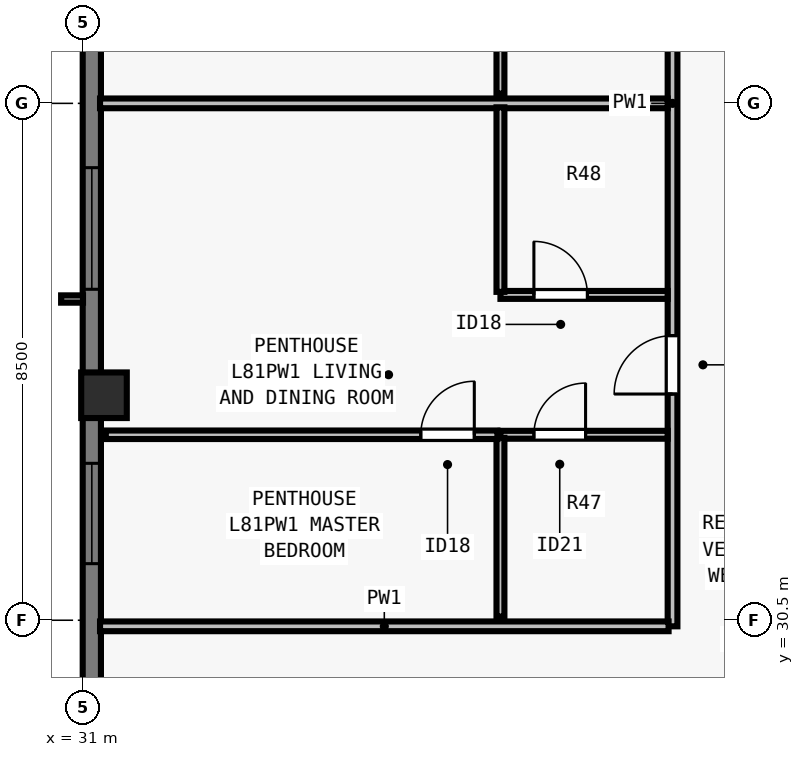
"""IFC4 building model, lengths in metres.
Left out: names, types, materials, properties, quantities, classifications, styles, units other than length and angle.
Written with IfcOpenShell. Run it as: python <this file> out.ifc"""

import sys

from ifc_helpers import new_model, si_unit, direction, frame, frame_2d, origin, origin_2d, place, context, subcontext, project, spatial, rectangle, extrude, element, fill, save


model = new_model("IFC4")
c1 = context("Model", 3, precision=1e-05, world=origin(), true_north=direction((0.0, 1.0)))
c2 = subcontext(c1, "Body", "Model", "MODEL_VIEW")
j1 = project(units=[si_unit("LENGTHUNIT", "METRE"), si_unit("PLANEANGLEUNIT", "RADIAN")], contexts=[c1])
p1 = place(None, origin())
s1 = spatial("IfcSite", under=j1, at=p1, CompositionType="ELEMENT")
p2 = place(p1, origin())
s2 = spatial("IfcBuilding", under=s1, at=p2, CompositionType="ELEMENT")
p3 = place(p2, frame((0.0, 0.0, 294.5)))
s3 = spatial("IfcBuildingStorey", under=s2, at=p3, CompositionType="ELEMENT", Elevation=294.5)
p4 = place(p3, frame((31.35, 34.2, 0.0), z_axis=(0.0, 0.0, 1.0), x_axis=(0.0, 1.0, 0.0)))
e1 = element("IfcColumn", 1, at=p4, inside=s3, PredefinedType="COLUMN", context=c2, shape_type="SweptSolid", body=[
    extrude(rectangle(XDim=0.75, YDim=0.75, at=origin_2d()), origin(), (0.0, 0.0, 1.0), 3.5),
])
p5 = place(p3, frame((31.15, 23.5, 0.0), z_axis=(0.0, 0.0, 1.0), x_axis=(0.0, 1.0, 0.0)))
e2 = element("IfcWall", 2, at=p5, inside=s3, PredefinedType="SOLIDWALL", context=c2, shape_type="SweptSolid", body=[
    extrude(rectangle(XDim=30.722, YDim=0.3, at=frame_2d((15.361, 0.0))), origin(), (0.0, 0.0, 1.0), 3.29),
])
p6 = place(p5, frame((7.93, 0.0, 0.8)))
e3 = element("IfcOpeningElement", 3, at=p6, cuts=e2, PredefinedType="OPENING", context=c2, shape_type="SweptSolid", body=[
    extrude(rectangle(XDim=1.65, YDim=1.758, at=frame_2d((0.825, 0.879))), frame((0.0, 0.16, 0.0), z_axis=(0.0, -1.0, 0.0), x_axis=(1.0, 0.0, 0.0)), (0.0, 0.0, 1.0), 0.32),
])
p7 = place(p5, frame((12.442, 0.0, 0.8)))
e4 = element("IfcOpeningElement", 4, at=p7, cuts=e2, PredefinedType="OPENING", context=c2, shape_type="SweptSolid", body=[
    extrude(rectangle(XDim=2.0, YDim=1.758, at=frame_2d((1.0, 0.879))), frame((0.0, 0.16, 0.0), z_axis=(0.0, -1.0, 0.0), x_axis=(1.0, 0.0, 0.0)), (0.0, 0.0, 1.0), 0.32),
])
p8 = place(p5, frame((16.455, 0.0, 0.8)))
e5 = element("IfcOpeningElement", 5, at=p8, cuts=e2, PredefinedType="OPENING", context=c2, shape_type="SweptSolid", body=[
    extrude(rectangle(XDim=1.65, YDim=1.758, at=frame_2d((0.825, 0.879))), frame((0.0, 0.16, 0.0), z_axis=(0.0, -1.0, 0.0), x_axis=(1.0, 0.0, 0.0)), (0.0, 0.0, 1.0), 0.32),
])
p9 = place(p5, frame((20.967, 0.0, 0.8)))
e6 = element("IfcOpeningElement", 6, at=p9, cuts=e2, PredefinedType="OPENING", context=c2, shape_type="SweptSolid", body=[
    extrude(rectangle(XDim=2.0, YDim=1.758, at=frame_2d((1.0, 0.879))), frame((0.0, 0.16, 0.0), z_axis=(0.0, -1.0, 0.0), x_axis=(1.0, 0.0, 0.0)), (0.0, 0.0, 1.0), 0.32),
])
p10 = place(p5, frame((24.579, 0.0, 0.8)))
e7 = element("IfcOpeningElement", 7, at=p10, cuts=e2, PredefinedType="OPENING", context=c2, shape_type="SweptSolid", body=[
    extrude(rectangle(XDim=1.65, YDim=1.758, at=frame_2d((0.825, 0.879))), frame((0.0, 0.16, 0.0), z_axis=(0.0, -1.0, 0.0), x_axis=(1.0, 0.0, 0.0)), (0.0, 0.0, 1.0), 0.32),
])
p11 = place(p5, frame((27.11, 0.0, 0.8)))
e8 = element("IfcOpeningElement", 8, at=p11, cuts=e2, PredefinedType="OPENING", context=c2, shape_type="SweptSolid", body=[
    extrude(rectangle(XDim=0.9, YDim=1.75, at=frame_2d((0.45, 0.875))), frame((0.0, 0.16, 0.0), z_axis=(0.0, -1.0, 0.0), x_axis=(1.0, 0.0, 0.0)), (0.0, 0.0, 1.0), 0.32),
])
p12 = place(p3, frame((40.7, 30.4, 0.0), z_axis=(0.0, 0.0, 1.0), x_axis=(0.0, 1.0, 0.0)))
e9 = element("IfcWall", 9, at=p12, inside=s3, PredefinedType="PARTITIONING", context=c2, shape_type="SweptSolid", body=[
    extrude(rectangle(XDim=17.2, YDim=0.16, at=frame_2d((8.6, 0.0))), origin(), (0.0, 0.0, 1.0), 3.009),
])
p13 = place(p12, frame((3.82, 0.0, 0.0)))
e10 = element("IfcOpeningElement", 10, at=p13, cuts=e9, PredefinedType="OPENING", context=c2, shape_type="SweptSolid", body=[
    extrude(rectangle(XDim=0.96, YDim=2.18, at=frame_2d((0.48, 1.09))), frame((0.0, 0.09, 0.0), z_axis=(0.0, -1.0, 0.0), x_axis=(1.0, 0.0, 0.0)), (0.0, 0.0, 1.0), 0.18),
])
p14 = place(p12, frame((12.42, 0.0, 0.0)))
e11 = element("IfcOpeningElement", 11, at=p14, cuts=e9, PredefinedType="OPENING", context=c2, shape_type="SweptSolid", body=[
    extrude(rectangle(XDim=0.96, YDim=2.18, at=frame_2d((0.48, 1.09))), frame((0.0, 0.09, 0.0), z_axis=(0.0, -1.0, 0.0), x_axis=(1.0, 0.0, 0.0)), (0.0, 0.0, 1.0), 0.18),
])
p15 = place(p3, frame((31.285, 30.4, 0.0), z_axis=(0.0, 0.0, 1.0), x_axis=(1.0, 0.0, 0.0)))
e12 = element("IfcWall", 12, at=p15, inside=s3, PredefinedType="PARTITIONING", context=c2, shape_type="SweptSolid", body=[
    extrude(rectangle(XDim=9.35, YDim=0.16, at=frame_2d((4.675, 0.0))), origin(), (0.0, 0.0, 1.0), 3.29),
])
p16 = place(p3, frame((31.285, 39.0, 0.0), z_axis=(0.0, 0.0, 1.0), x_axis=(1.0, 0.0, 0.0)))
e13 = element("IfcWall", 13, at=p16, inside=s3, PredefinedType="PARTITIONING", context=c2, shape_type="SweptSolid", body=[
    extrude(rectangle(XDim=9.335, YDim=0.16, at=frame_2d((4.667, 0.0))), origin(), (0.0, 0.0, 1.0), 3.29),
])
p17 = place(p3, frame((37.87, 33.55, 0.0), z_axis=(0.0, 0.0, 1.0), x_axis=(1.0, 0.0, 0.0)))
e14 = element("IfcWall", 14, at=p17, inside=s3, PredefinedType="PLUMBINGWALL", context=c2, shape_type="SweptSolid", body=[
    extrude(rectangle(XDim=2.75, YDim=0.13, at=frame_2d((1.375, 0.0))), origin(), (0.0, 0.0, 1.0), 3.29),
])
p18 = place(p17, frame((0.55, 0.0, 0.0)))
e15 = element("IfcOpeningElement", 15, at=p18, cuts=e14, PredefinedType="OPENING", context=c2, shape_type="SweptSolid", body=[
    extrude(rectangle(XDim=0.85, YDim=2.08, at=frame_2d((0.425, 1.04))), frame((0.0, 0.075, 0.0), z_axis=(0.0, -1.0, 0.0), x_axis=(1.0, 0.0, 0.0)), (0.0, 0.0, 1.0), 0.15),
])
p19 = place(p3, frame((37.87, 30.56, 0.0), z_axis=(0.0, 0.0, 1.0), x_axis=(0.0, 1.0, 0.0)))
e16 = element("IfcWall", 16, at=p19, inside=s3, PredefinedType="PLUMBINGWALL", context=c2, shape_type="SweptSolid", body=[
    extrude(rectangle(XDim=2.94, YDim=0.13, at=frame_2d((1.47, 0.0))), origin(), (0.0, 0.0, 1.0), 3.29),
])
p20 = place(p3, frame((37.87, 35.85, 0.0), z_axis=(0.0, 0.0, 1.0), x_axis=(1.0, 0.0, 0.0)))
e17 = element("IfcWall", 17, at=p20, inside=s3, PredefinedType="PLUMBINGWALL", context=c2, shape_type="SweptSolid", body=[
    extrude(rectangle(XDim=2.75, YDim=0.13, at=frame_2d((1.375, 0.0))), origin(), (0.0, 0.0, 1.0), 3.29),
])
p21 = place(p20, frame((0.55, 0.0, 0.0)))
e18 = element("IfcOpeningElement", 18, at=p21, cuts=e17, PredefinedType="OPENING", context=c2, shape_type="SweptSolid", body=[
    extrude(rectangle(XDim=0.88, YDim=2.1, at=frame_2d((0.44, 1.05))), frame((0.0, 0.075, 0.0), z_axis=(0.0, -1.0, 0.0), x_axis=(1.0, 0.0, 0.0)), (0.0, 0.0, 1.0), 0.15),
])
p22 = place(p3, frame((37.87, 35.9, 0.0), z_axis=(0.0, 0.0, 1.0), x_axis=(0.0, 1.0, 0.0)))
e19 = element("IfcWall", 19, at=p22, inside=s3, PredefinedType="PLUMBINGWALL", context=c2, shape_type="SweptSolid", body=[
    extrude(rectangle(XDim=3.035, YDim=0.13, at=frame_2d((1.518, 0.0))), origin(), (0.0, 0.0, 1.0), 3.29),
])
p23 = place(p3, frame((31.38, 33.55, 0.0), z_axis=(0.0, 0.0, 1.0), x_axis=(1.0, 0.0, 0.0)))
e20 = element("IfcWall", 20, at=p23, inside=s3, PredefinedType="PARTITIONING", context=c2, shape_type="SweptSolid", body=[
    extrude(rectangle(XDim=6.44, YDim=0.14, at=frame_2d((3.22, 0.0))), origin(), (0.0, 0.0, 1.0), 2.653),
])
p24 = place(p23, frame((5.18, 0.0, 0.0)))
e21 = element("IfcOpeningElement", 21, at=p24, cuts=e20, PredefinedType="OPENING", context=c2, shape_type="SweptSolid", body=[
    extrude(rectangle(XDim=0.88, YDim=2.1, at=frame_2d((0.44, 1.05))), frame((0.0, 0.08, 0.0), z_axis=(0.0, -1.0, 0.0), x_axis=(1.0, 0.0, 0.0)), (0.0, 0.0, 1.0), 0.16),
])
p25 = place(p3, frame((37.87, 39.16, 0.0), z_axis=(0.0, 0.0, 1.0), x_axis=(0.0, 1.0, 0.0)))
e22 = element("IfcWall", 22, at=p25, inside=s3, PredefinedType="PLUMBINGWALL", context=c2, shape_type="SweptSolid", body=[
    extrude(rectangle(XDim=2.94, YDim=0.13, at=frame_2d((1.47, 0.0))), origin(), (0.0, 0.0, 1.0), 3.009),
])
p26 = place(p6, origin())
e23 = element("IfcWindow", 23, at=p26, inside=s3, PartitioningType="SINGLE_PANEL", PredefinedType="WINDOW", context=c2, shape_type="SweptSolid", body=[
    extrude(rectangle(XDim=1.65, YDim=1.758, at=frame_2d((0.825, 0.879))), frame((0.0, -0.05, 0.0), z_axis=(0.0, -1.0, 0.0), x_axis=(1.0, 0.0, 0.0)), (0.0, 0.0, 1.0), 0.06),
])
fill(e3, e23)
p27 = place(p7, origin())
e24 = element("IfcWindow", 24, at=p27, inside=s3, PartitioningType="SINGLE_PANEL", PredefinedType="WINDOW", context=c2, shape_type="SweptSolid", body=[
    extrude(rectangle(XDim=2.0, YDim=1.758, at=frame_2d((1.0, 0.879))), frame((0.0, -0.05, 0.0), z_axis=(0.0, -1.0, 0.0), x_axis=(1.0, 0.0, 0.0)), (0.0, 0.0, 1.0), 0.06),
])
fill(e4, e24)
p28 = place(p18, origin())
e25 = element("IfcDoor", 25, at=p28, inside=s3, OperationType="SINGLE_SWING_RIGHT", PredefinedType="DOOR", context=c2, shape_type="SweptSolid", body=[
    extrude(rectangle(XDim=0.85, YDim=2.08, at=frame_2d((0.425, 1.04))), frame((0.0, 0.025, 0.0), z_axis=(0.0, -1.0, 0.0), x_axis=(1.0, 0.0, 0.0)), (0.0, 0.0, 1.0), 0.05),
])
fill(e15, e25)
p29 = place(p21, origin())
e26 = element("IfcDoor", 26, at=p29, inside=s3, OperationType="SINGLE_SWING_LEFT", PredefinedType="DOOR", context=c2, shape_type="SweptSolid", body=[
    extrude(rectangle(XDim=0.88, YDim=2.1, at=frame_2d((0.44, 1.05))), frame((0.0, 0.025, 0.0), z_axis=(0.0, -1.0, 0.0), x_axis=(1.0, 0.0, 0.0)), (0.0, 0.0, 1.0), 0.05),
])
fill(e18, e26)
p30 = place(p24, origin())
e27 = element("IfcDoor", 27, at=p30, inside=s3, OperationType="SINGLE_SWING_RIGHT", PredefinedType="DOOR", context=c2, shape_type="SweptSolid", body=[
    extrude(rectangle(XDim=0.88, YDim=2.1, at=frame_2d((0.44, 1.05))), frame((0.0, 0.025, 0.0), z_axis=(0.0, -1.0, 0.0), x_axis=(1.0, 0.0, 0.0)), (0.0, 0.0, 1.0), 0.05),
])
fill(e21, e27)
p31 = place(p13, origin())
e28 = element("IfcDoor", 28, at=p31, inside=s3, OperationType="SINGLE_SWING_LEFT", PredefinedType="DOOR", context=c2, shape_type="SweptSolid", body=[
    extrude(rectangle(XDim=0.96, YDim=2.18, at=frame_2d((0.48, 1.09))), frame((0.0, 0.025, 0.0), z_axis=(0.0, -1.0, 0.0), x_axis=(1.0, 0.0, 0.0)), (0.0, 0.0, 1.0), 0.05),
])
fill(e10, e28)
save(model, sys.argv[1])
